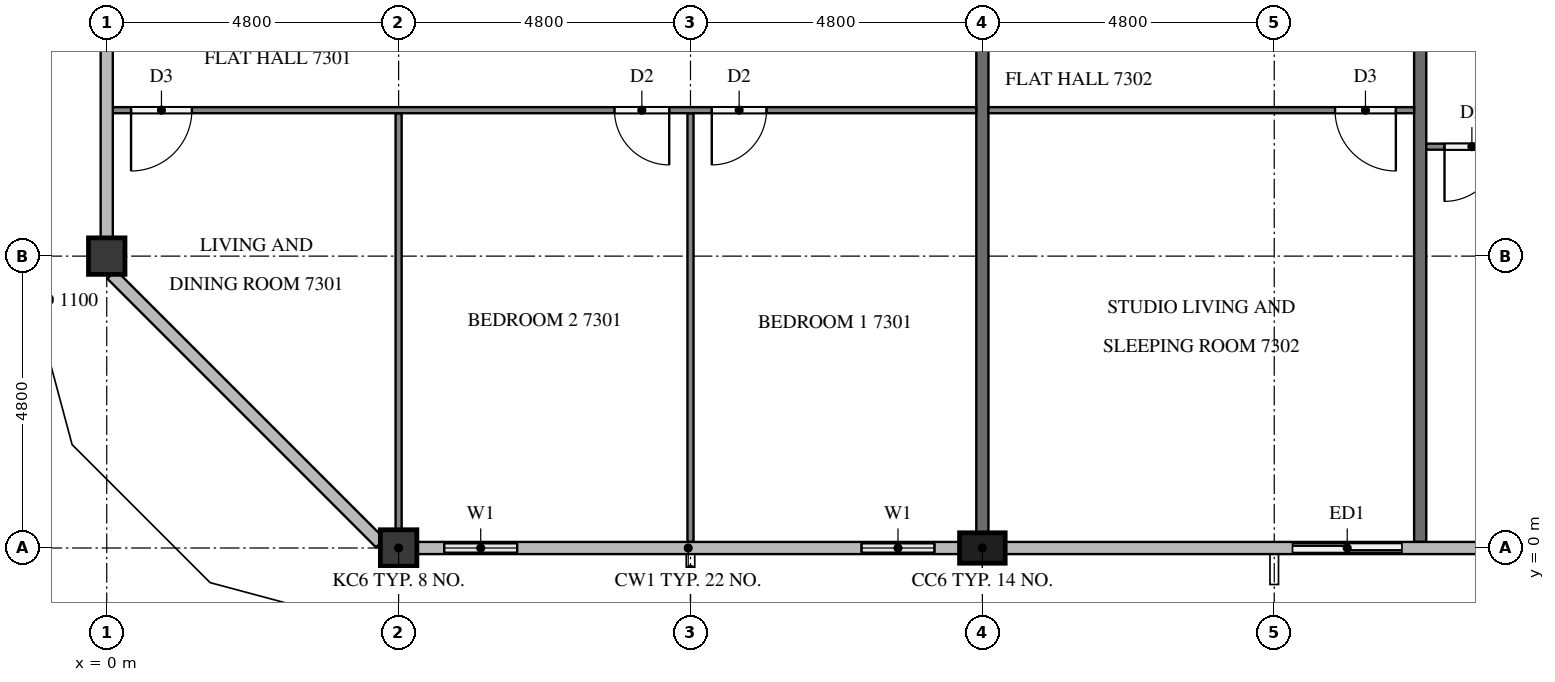
"""IFC4 building model, lengths in metres.
Left out: names, types, materials, properties, quantities, classifications, styles, units other than length and angle.
Written with IfcOpenShell. Run it as: python <this file> out.ifc"""

import sys

from ifc_helpers import new_model, si_unit, direction, frame, frame_2d, origin, origin_2d, place, context, subcontext, project, spatial, rectangle, extrude, element, fill, save


model = new_model("IFC4")
c1 = context("Model", 3, precision=1e-05, world=origin(), true_north=direction((0.0, 1.0)))
c2 = subcontext(c1, "Body", "Model", "MODEL_VIEW")
j1 = project(units=[si_unit("LENGTHUNIT", "METRE"), si_unit("PLANEANGLEUNIT", "RADIAN")], contexts=[c1])
p1 = place(None, origin())
s1 = spatial("IfcSite", under=j1, at=p1, CompositionType="ELEMENT")
p2 = place(p1, origin())
s2 = spatial("IfcBuilding", under=s1, at=p2, CompositionType="ELEMENT")
p3 = place(p2, frame((0.0, 0.0, 279.1)))
s3 = spatial("IfcBuildingStorey", under=s2, at=p3, CompositionType="ELEMENT", Elevation=279.1)
p4 = place(p3, frame((4.8, 0.0, 0.0), z_axis=(0.0, 0.0, 1.0), x_axis=(1.0, 0.0, 0.0)))
e1 = element("IfcColumn", 1, at=p4, inside=s3, PredefinedType="COLUMN", context=c2, shape_type="SweptSolid", body=[
    extrude(rectangle(XDim=0.6, YDim=0.6, at=origin_2d()), origin(), (0.0, 0.0, 1.0), 3.2),
])
p5 = place(p3, frame((14.4, 0.0, 0.0), z_axis=(0.0, 0.0, 1.0), x_axis=(1.0, 0.0, 0.0)))
e2 = element("IfcColumn", 2, at=p5, inside=s3, PredefinedType="COLUMN", context=c2, shape_type="SweptSolid", body=[
    extrude(rectangle(XDim=0.75, YDim=0.5, at=origin_2d()), origin(), (0.0, 0.0, 1.0), 3.2),
])
p6 = place(p3, frame((0.0, 4.8, 0.0), z_axis=(0.0, 0.0, 1.0), x_axis=(1.0, 0.0, 0.0)))
e3 = element("IfcColumn", 3, at=p6, inside=s3, PredefinedType="COLUMN", context=c2, shape_type="SweptSolid", body=[
    extrude(rectangle(XDim=0.6, YDim=0.6, at=origin_2d()), origin(), (0.0, 0.0, 1.0), 3.2),
])
p7 = place(p3, frame((5.1, 0.0, 0.0), z_axis=(0.0, 0.0, 1.0), x_axis=(1.0, 0.0, 0.0)))
e4 = element("IfcWall", 4, at=p7, inside=s3, PredefinedType="SOLIDWALL", context=c2, shape_type="SweptSolid", body=[
    extrude(rectangle(XDim=2.1, YDim=0.15, at=frame_2d((1.05, 0.0))), origin(), (0.0, 0.0, 1.0), 3.2),
])
p8 = place(p7, frame((0.45, 0.0, 0.9)))
e5 = element("IfcOpeningElement", 5, at=p8, cuts=e4, PredefinedType="OPENING", context=c2, shape_type="SweptSolid", body=[
    extrude(rectangle(XDim=1.2, YDim=1.4, at=frame_2d((0.6, 0.7))), frame((0.0, 0.085, 0.0), z_axis=(0.0, -1.0, 0.0), x_axis=(1.0, 0.0, 0.0)), (0.0, 0.0, 1.0), 0.17),
])
p9 = place(p3, frame((12.0, 0.0, 0.0), z_axis=(0.0, 0.0, 1.0), x_axis=(1.0, 0.0, 0.0)))
e6 = element("IfcWall", 6, at=p9, inside=s3, PredefinedType="SOLIDWALL", context=c2, shape_type="SweptSolid", body=[
    extrude(rectangle(XDim=2.025, YDim=0.15, at=frame_2d((1.012, 0.0))), origin(), (0.0, 0.0, 1.0), 3.2),
])
p10 = place(p9, frame((0.413, 0.0, 0.9)))
e7 = element("IfcOpeningElement", 7, at=p10, cuts=e6, PredefinedType="OPENING", context=c2, shape_type="SweptSolid", body=[
    extrude(rectangle(XDim=1.2, YDim=1.4, at=frame_2d((0.6, 0.7))), frame((0.0, 0.085, 0.0), z_axis=(0.0, -1.0, 0.0), x_axis=(1.0, 0.0, 0.0)), (0.0, 0.0, 1.0), 0.17),
])
p11 = place(p3, frame((19.2, 0.0, 0.0), z_axis=(0.0, 0.0, 1.0), x_axis=(1.0, 0.0, 0.0)))
e8 = element("IfcWall", 8, at=p11, inside=s3, PredefinedType="SOLIDWALL", context=c2, shape_type="SweptSolid", body=[
    extrude(rectangle(XDim=2.4, YDim=0.15, at=frame_2d((1.2, 0.0))), origin(), (0.0, 0.0, 1.0), 3.2),
])
p12 = place(p11, frame((0.3, 0.0, 0.0)))
e9 = element("IfcOpeningElement", 9, at=p12, cuts=e8, PredefinedType="OPENING", context=c2, shape_type="SweptSolid", body=[
    extrude(rectangle(XDim=1.8, YDim=2.4, at=frame_2d((0.9, 1.2))), frame((0.0, 0.085, 0.0), z_axis=(0.0, -1.0, 0.0), x_axis=(1.0, 0.0, 0.0)), (0.0, 0.0, 1.0), 0.17),
])
p13 = place(p3, frame((14.4, 11.9, 0.0), z_axis=(0.0, 0.0, 1.0), x_axis=(0.0, -1.0, 0.0)))
e10 = element("IfcWall", 10, at=p13, inside=s3, PredefinedType="PARTITIONING", context=c2, shape_type="SweptSolid", body=[
    extrude(rectangle(XDim=11.65, YDim=0.2, at=frame_2d((5.825, 0.0))), origin(), (0.0, 0.0, 1.0), 3.2),
])
p14 = place(p3, frame((21.6, 11.9, 0.0), z_axis=(0.0, 0.0, 1.0), x_axis=(0.0, -1.0, 0.0)))
e11 = element("IfcWall", 11, at=p14, inside=s3, PredefinedType="PARTITIONING", context=c2, shape_type="SweptSolid", body=[
    extrude(rectangle(XDim=11.8, YDim=0.2, at=frame_2d((5.9, 0.0))), origin(), (0.0, 0.0, 1.0), 3.2),
])
p15 = place(p3, frame((9.6, 7.15, 0.0), z_axis=(0.0, 0.0, 1.0), x_axis=(0.0, -1.0, 0.0)))
e12 = element("IfcWall", 12, at=p15, inside=s3, PredefinedType="PARTITIONING", context=c2, shape_type="SweptSolid", body=[
    extrude(rectangle(XDim=7.05, YDim=0.1, at=frame_2d((3.525, 0.0))), origin(), (0.0, 0.0, 1.0), 3.2),
])
p16 = place(p3, frame((4.8, 7.15, 0.0), z_axis=(0.0, 0.0, 1.0), x_axis=(0.0, -1.0, 0.0)))
e13 = element("IfcWall", 13, at=p16, inside=s3, PredefinedType="PARTITIONING", context=c2, shape_type="SweptSolid", body=[
    extrude(rectangle(XDim=6.85, YDim=0.1, at=frame_2d((3.425, 0.0))), origin(), (0.0, 0.0, 1.0), 3.2),
])
p17 = place(p3, frame((14.3, 7.2, 0.0), z_axis=(0.0, 0.0, 1.0), x_axis=(-1.0, 0.0, 0.0)))
e14 = element("IfcWall", 14, at=p17, inside=s3, PredefinedType="PARTITIONING", context=c2, shape_type="SweptSolid", body=[
    extrude(rectangle(XDim=14.2, YDim=0.1, at=frame_2d((7.1, 0.0))), origin(), (0.0, 0.0, 1.0), 3.2),
])
p18 = place(p17, frame((3.45, 0.0, 0.0)))
e15 = element("IfcOpeningElement", 15, at=p18, cuts=e14, PredefinedType="OPENING", context=c2, shape_type="SweptSolid", body=[
    extrude(rectangle(XDim=0.9, YDim=2.1, at=frame_2d((0.45, 1.05))), frame((0.0, 0.06, 0.0), z_axis=(0.0, -1.0, 0.0), x_axis=(1.0, 0.0, 0.0)), (0.0, 0.0, 1.0), 0.12),
])
p19 = place(p17, frame((5.05, 0.0, 0.0)))
e16 = element("IfcOpeningElement", 16, at=p19, cuts=e14, PredefinedType="OPENING", context=c2, shape_type="SweptSolid", body=[
    extrude(rectangle(XDim=0.9, YDim=2.1, at=frame_2d((0.45, 1.05))), frame((0.0, 0.06, 0.0), z_axis=(0.0, -1.0, 0.0), x_axis=(1.0, 0.0, 0.0)), (0.0, 0.0, 1.0), 0.12),
])
p20 = place(p17, frame((12.9, 0.0, 0.0)))
e17 = element("IfcOpeningElement", 17, at=p20, cuts=e14, PredefinedType="OPENING", context=c2, shape_type="SweptSolid", body=[
    extrude(rectangle(XDim=1.0, YDim=2.1, at=frame_2d((0.5, 1.05))), frame((0.0, 0.06, 0.0), z_axis=(0.0, -1.0, 0.0), x_axis=(1.0, 0.0, 0.0)), (0.0, 0.0, 1.0), 0.12),
])
p21 = place(p3, frame((21.5, 7.2, 0.0), z_axis=(0.0, 0.0, 1.0), x_axis=(-1.0, 0.0, 0.0)))
e18 = element("IfcWall", 18, at=p21, inside=s3, PredefinedType="PARTITIONING", context=c2, shape_type="SweptSolid", body=[
    extrude(rectangle(XDim=7.0, YDim=0.1, at=frame_2d((3.5, 0.0))), origin(), (0.0, 0.0, 1.0), 3.2),
])
p22 = place(p21, frame((0.3, 0.0, 0.0)))
e19 = element("IfcOpeningElement", 19, at=p22, cuts=e18, PredefinedType="OPENING", context=c2, shape_type="SweptSolid", body=[
    extrude(rectangle(XDim=1.0, YDim=2.1, at=frame_2d((0.5, 1.05))), frame((0.0, 0.06, 0.0), z_axis=(0.0, -1.0, 0.0), x_axis=(1.0, 0.0, 0.0)), (0.0, 0.0, 1.0), 0.12),
])
p23 = place(p3, frame((35.9, 6.6, 0.0), z_axis=(0.0, 0.0, 1.0), x_axis=(-1.0, 0.0, 0.0)))
e20 = element("IfcWall", 20, at=p23, inside=s3, PredefinedType="PARTITIONING", context=c2, shape_type="SweptSolid", body=[
    extrude(rectangle(XDim=14.2, YDim=0.1, at=frame_2d((7.1, 0.0))), origin(), (0.0, 0.0, 1.0), 3.2),
])
p24 = place(p23, frame((13.0, 0.0, 0.0)))
e21 = element("IfcOpeningElement", 21, at=p24, cuts=e20, PredefinedType="OPENING", context=c2, shape_type="SweptSolid", body=[
    extrude(rectangle(XDim=0.9, YDim=2.1, at=frame_2d((0.45, 1.05))), frame((0.0, 0.06, 0.0), z_axis=(0.0, -1.0, 0.0), x_axis=(1.0, 0.0, 0.0)), (0.0, 0.0, 1.0), 0.12),
])
p25 = place(p23, frame((5.05, 0.0, 0.0)))
e22 = element("IfcOpeningElement", 22, at=p25, cuts=e20, PredefinedType="OPENING", context=c2, shape_type="SweptSolid", body=[
    extrude(rectangle(XDim=1.0, YDim=2.1, at=frame_2d((0.5, 1.05))), frame((0.0, 0.06, 0.0), z_axis=(0.0, -1.0, 0.0), x_axis=(1.0, 0.0, 0.0)), (0.0, 0.0, 1.0), 0.12),
])
p26 = place(p23, frame((3.45, 0.0, 0.0)))
e23 = element("IfcOpeningElement", 23, at=p26, cuts=e20, PredefinedType="OPENING", context=c2, shape_type="SweptSolid", body=[
    extrude(rectangle(XDim=0.9, YDim=2.1, at=frame_2d((0.45, 1.05))), frame((0.0, 0.06, 0.0), z_axis=(0.0, -1.0, 0.0), x_axis=(1.0, 0.0, 0.0)), (0.0, 0.0, 1.0), 0.12),
])
p27 = place(p8, origin())
e24 = element("IfcWindow", 24, at=p27, inside=s3, PartitioningType="SINGLE_PANEL", PredefinedType="WINDOW", context=c2, shape_type="SweptSolid", body=[
    extrude(rectangle(XDim=1.2, YDim=1.4, at=frame_2d((0.6, 0.7))), frame((0.0, 0.03, 0.0), z_axis=(0.0, -1.0, 0.0), x_axis=(1.0, 0.0, 0.0)), (0.0, 0.0, 1.0), 0.06),
])
fill(e5, e24)
p28 = place(p10, origin())
e25 = element("IfcWindow", 25, at=p28, inside=s3, PartitioningType="SINGLE_PANEL", PredefinedType="WINDOW", context=c2, shape_type="SweptSolid", body=[
    extrude(rectangle(XDim=1.2, YDim=1.4, at=frame_2d((0.6, 0.7))), frame((0.0, 0.03, 0.0), z_axis=(0.0, -1.0, 0.0), x_axis=(1.0, 0.0, 0.0)), (0.0, 0.0, 1.0), 0.06),
])
fill(e7, e25)
p29 = place(p12, origin())
e26 = element("IfcDoor", 26, at=p29, inside=s3, OperationType="SLIDING_TO_LEFT", PredefinedType="DOOR", context=c2, shape_type="SweptSolid", body=[
    extrude(rectangle(XDim=1.8, YDim=2.4, at=frame_2d((0.9, 1.2))), frame((0.0, 0.025, 0.0), z_axis=(0.0, -1.0, 0.0), x_axis=(1.0, 0.0, 0.0)), (0.0, 0.0, 1.0), 0.05),
])
fill(e9, e26)
p30 = place(p18, origin())
e27 = element("IfcDoor", 27, at=p30, inside=s3, OperationType="SINGLE_SWING_RIGHT", PredefinedType="DOOR", context=c2, shape_type="SweptSolid", body=[
    extrude(rectangle(XDim=0.9, YDim=2.1, at=frame_2d((0.45, 1.05))), frame((0.0, 0.025, 0.0), z_axis=(0.0, -1.0, 0.0), x_axis=(1.0, 0.0, 0.0)), (0.0, 0.0, 1.0), 0.05),
])
fill(e15, e27)
p31 = place(p19, origin())
e28 = element("IfcDoor", 28, at=p31, inside=s3, OperationType="SINGLE_SWING_LEFT", PredefinedType="DOOR", context=c2, shape_type="SweptSolid", body=[
    extrude(rectangle(XDim=0.9, YDim=2.1, at=frame_2d((0.45, 1.05))), frame((0.0, 0.025, 0.0), z_axis=(0.0, -1.0, 0.0), x_axis=(1.0, 0.0, 0.0)), (0.0, 0.0, 1.0), 0.05),
])
fill(e16, e28)
p32 = place(p20, origin())
e29 = element("IfcDoor", 29, at=p32, inside=s3, OperationType="SINGLE_SWING_RIGHT", PredefinedType="DOOR", context=c2, shape_type="SweptSolid", body=[
    extrude(rectangle(XDim=1.0, YDim=2.1, at=frame_2d((0.5, 1.05))), frame((0.0, 0.025, 0.0), z_axis=(0.0, -1.0, 0.0), x_axis=(1.0, 0.0, 0.0)), (0.0, 0.0, 1.0), 0.05),
])
fill(e17, e29)
p33 = place(p22, origin())
e30 = element("IfcDoor", 30, at=p33, inside=s3, OperationType="SINGLE_SWING_LEFT", PredefinedType="DOOR", context=c2, shape_type="SweptSolid", body=[
    extrude(rectangle(XDim=1.0, YDim=2.1, at=frame_2d((0.5, 1.05))), frame((0.0, 0.025, 0.0), z_axis=(0.0, -1.0, 0.0), x_axis=(1.0, 0.0, 0.0)), (0.0, 0.0, 1.0), 0.05),
])
fill(e19, e30)
p34 = place(p24, origin())
e31 = element("IfcDoor", 31, at=p34, inside=s3, OperationType="SINGLE_SWING_RIGHT", PredefinedType="DOOR", context=c2, shape_type="SweptSolid", body=[
    extrude(rectangle(XDim=0.9, YDim=2.1, at=frame_2d((0.45, 1.05))), frame((0.0, 0.025, 0.0), z_axis=(0.0, -1.0, 0.0), x_axis=(1.0, 0.0, 0.0)), (0.0, 0.0, 1.0), 0.05),
])
fill(e21, e31)
save(model, sys.argv[1])
